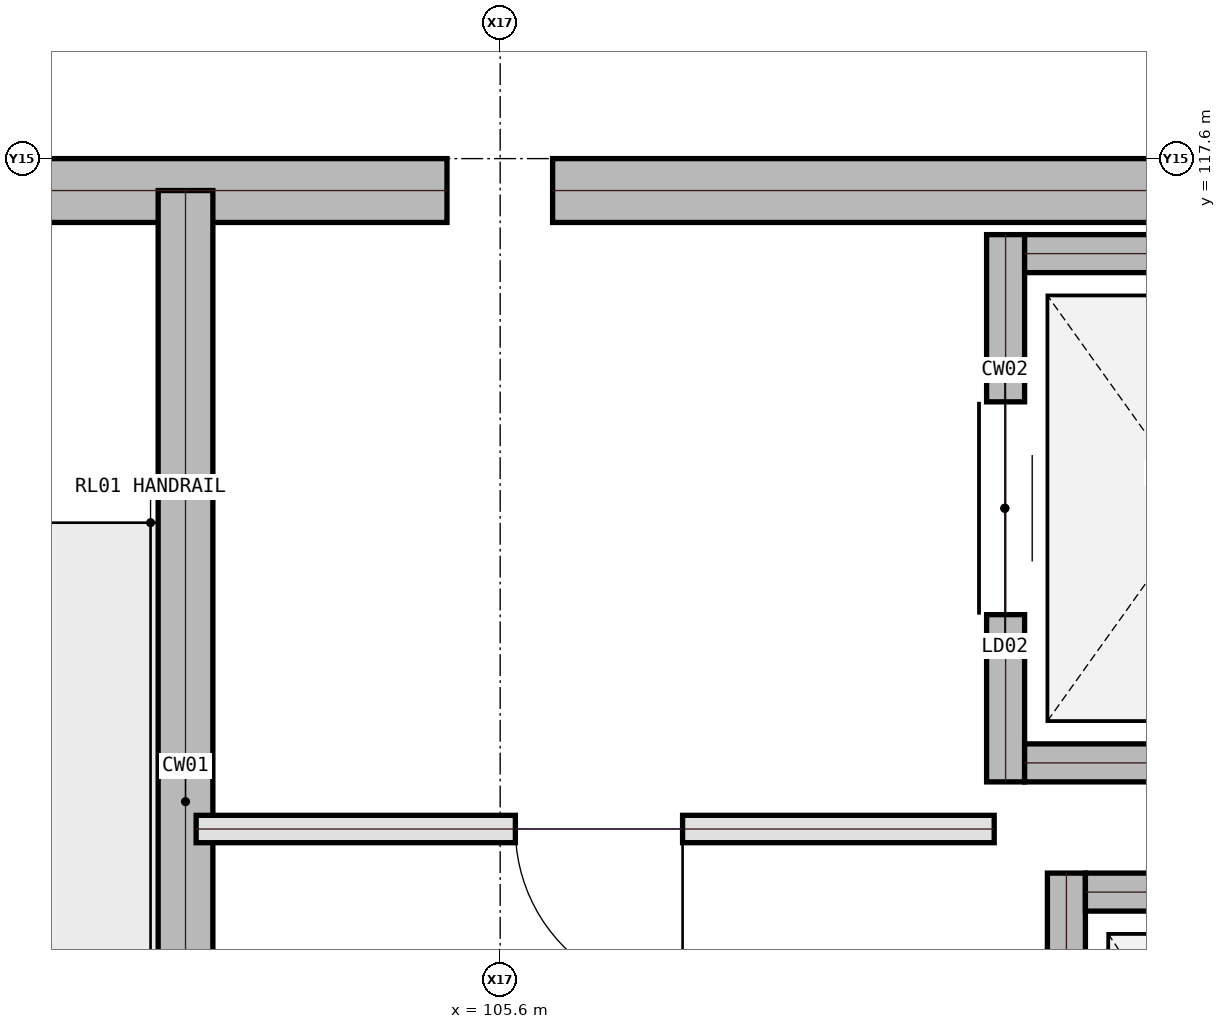
"""IFC4 building model, lengths in metres.
Left out: names, types, materials, properties, quantities, classifications, styles, units other than length and angle.
Written with IfcOpenShell. Run it as: python <this file> out.ifc"""

import sys

from ifc_helpers import new_model, si_unit, direction, frame, frame_2d, origin, origin_2d, place, context, subcontext, project, spatial, rectangle, extrude, element, fill, save


model = new_model("IFC4")
c1 = context("Model", 3, precision=1e-05, world=origin(), true_north=direction((0.0, 1.0)))
c2 = subcontext(c1, "Body", "Model", "MODEL_VIEW")
j1 = project(units=[si_unit("LENGTHUNIT", "METRE"), si_unit("PLANEANGLEUNIT", "RADIAN")], contexts=[c1])
p1 = place(None, origin())
s1 = spatial("IfcSite", under=j1, at=p1, CompositionType="ELEMENT")
p2 = place(p1, origin())
s2 = spatial("IfcBuilding", under=s1, at=p2, CompositionType="ELEMENT")
p3 = place(p2, frame((0.0, 0.0, -4.5)))
s3 = spatial("IfcBuildingStorey", under=s2, at=p3, CompositionType="ELEMENT", Elevation=-4.5)
p4 = place(p3, frame((105.6, 117.6, 0.0), z_axis=(0.0, 0.0, 1.0), x_axis=(1.0, 0.0, 0.0)))
e1 = element("IfcColumn", 1, at=p4, inside=s3, PredefinedType="COLUMN", context=c2, shape_type="SweptSolid", body=[
    extrude(rectangle(XDim=0.7, YDim=0.7, at=origin_2d()), origin(), (0.0, 0.0, 1.0), 4.5),
])
p5 = place(p3, frame((105.25, 117.39, 0.0), z_axis=(0.0, 0.0, 1.0), x_axis=(-1.0, 0.0, 0.0)))
e2 = element("IfcWall", 2, at=p5, inside=s3, PredefinedType="SOLIDWALL", context=c2, shape_type="SweptSolid", body=[
    extrude(rectangle(XDim=5.9, YDim=0.42, at=frame_2d((2.95, 0.0))), origin(), (0.0, 0.0, 1.0), 4.14),
])
p6 = place(p3, frame((111.855, 117.39, 0.0), z_axis=(0.0, 0.0, 1.0), x_axis=(-1.0, 0.0, 0.0)))
e3 = element("IfcWall", 3, at=p6, inside=s3, PredefinedType="SOLIDWALL", context=c2, shape_type="SweptSolid", body=[
    extrude(rectangle(XDim=5.91, YDim=0.42, at=frame_2d((2.955, 0.0))), origin(), (0.0, 0.0, 1.0), 4.14),
])
p7 = place(p3, frame((103.53, 109.34, 0.0), z_axis=(0.0, 0.0, 1.0), x_axis=(0.0, 1.0, 0.0)))
e4 = element("IfcWall", 4, at=p7, inside=s3, PredefinedType="SHEAR", context=c2, shape_type="SweptSolid", body=[
    extrude(rectangle(XDim=8.05, YDim=0.36, at=frame_2d((4.025, 0.0))), origin(), (0.0, 0.0, 1.0), 4.14),
])
p8 = place(p7, frame((0.45, 0.0, 0.0)))
e5 = element("IfcOpeningElement", 5, at=p8, cuts=e4, PredefinedType="OPENING", context=c2, shape_type="SweptSolid", body=[
    extrude(rectangle(XDim=1.25, YDim=2.15, at=frame_2d((0.625, 1.075))), frame((0.0, 0.19, 0.0), z_axis=(0.0, -1.0, 0.0), x_axis=(1.0, 0.0, 0.0)), (0.0, 0.0, 1.0), 0.38),
])
p9 = place(p3, frame((109.325, 109.7, 0.0), z_axis=(0.0, 0.0, 1.0), x_axis=(0.0, 1.0, 0.0)))
e6 = element("IfcWall", 6, at=p9, inside=s3, PredefinedType="SHEAR", context=c2, shape_type="SweptSolid", body=[
    extrude(rectangle(XDim=3.2, YDim=0.25, at=frame_2d((1.6, 0.0))), origin(), (0.0, 0.0, 1.0), 4.14),
])
p10 = place(p9, frame((1.05, 0.0, 0.0)))
e7 = element("IfcOpeningElement", 7, at=p10, cuts=e6, PredefinedType="OPENING", context=c2, shape_type="SweptSolid", body=[
    extrude(rectangle(XDim=1.1, YDim=2.15, at=frame_2d((0.55, 1.075))), frame((0.0, 0.135, 0.0), z_axis=(0.0, -1.0, 0.0), x_axis=(1.0, 0.0, 0.0)), (0.0, 0.0, 1.0), 0.27),
])
p11 = place(p3, frame((109.45, 112.775, 0.0), z_axis=(0.0, 0.0, 1.0), x_axis=(1.0, 0.0, 0.0)))
e8 = element("IfcWall", 8, at=p11, inside=s3, PredefinedType="SHEAR", context=c2, shape_type="SweptSolid", body=[
    extrude(rectangle(XDim=1.9, YDim=0.25, at=frame_2d((0.95, 0.0))), origin(), (0.0, 0.0, 1.0), 4.14),
])
p12 = place(p3, frame((108.925, 113.5, 0.0), z_axis=(0.0, 0.0, 1.0), x_axis=(0.0, 1.0, 0.0)))
e9 = element("IfcWall", 9, at=p12, inside=s3, PredefinedType="SHEAR", context=c2, shape_type="SweptSolid", body=[
    extrude(rectangle(XDim=3.6, YDim=0.25, at=frame_2d((1.8, 0.0))), origin(), (0.0, 0.0, 1.0), 4.14),
])
p13 = place(p12, frame((1.1, 0.0, 0.0)))
e10 = element("IfcOpeningElement", 10, at=p13, cuts=e9, PredefinedType="OPENING", context=c2, shape_type="SweptSolid", body=[
    extrude(rectangle(XDim=1.4, YDim=2.2, at=frame_2d((0.7, 1.1))), frame((0.0, 0.135, 0.0), z_axis=(0.0, -1.0, 0.0), x_axis=(1.0, 0.0, 0.0)), (0.0, 0.0, 1.0), 0.27),
])
for number, where, z_axis, x_axis in (
    (11, (109.05, 113.625, 0.0), (0.0, 0.0, 1.0), (1.0, 0.0, 0.0)),
    (12, (109.05, 116.975, 0.0), (0.0, 0.0, 1.0), (1.0, 0.0, 0.0)),
):
    element("IfcWall", number, at=place(p3, frame(where, z_axis=z_axis, x_axis=x_axis)), inside=s3, PredefinedType="SHEAR", context=c2, shape_type="SweptSolid", body=[
        extrude(rectangle(XDim=2.3, YDim=0.25, at=frame_2d((1.15, 0.0))), origin(), (0.0, 0.0, 1.0), 4.14),
    ])
p14 = place(p3, frame((103.6, 113.19, 0.0), z_axis=(0.0, 0.0, 1.0), x_axis=(1.0, 0.0, 0.0)))
e13 = element("IfcWall", 13, at=p14, inside=s3, PredefinedType="SOLIDWALL", context=c2, shape_type="SweptSolid", body=[
    extrude(rectangle(XDim=5.25, YDim=0.18, at=frame_2d((2.625, 0.0))), origin(), (0.0, 0.0, 1.0), 4.14),
])
p15 = place(p14, frame((2.1, 0.0, 0.0)))
e14 = element("IfcOpeningElement", 14, at=p15, cuts=e13, PredefinedType="OPENING", context=c2, shape_type="SweptSolid", body=[
    extrude(rectangle(XDim=1.1, YDim=2.15, at=frame_2d((0.55, 1.075))), frame((0.0, 0.1, 0.0), z_axis=(0.0, -1.0, 0.0), x_axis=(1.0, 0.0, 0.0)), (0.0, 0.0, 1.0), 0.2),
])
p16 = place(p13, origin())
e15 = element("IfcDoor", 15, at=p16, inside=s3, OperationType="SLIDING_TO_LEFT", PredefinedType="DOOR", context=c2, shape_type="SweptSolid", body=[
    extrude(rectangle(XDim=1.4, YDim=2.2, at=frame_2d((0.7, 1.1))), frame((0.0, 0.025, 0.0), z_axis=(0.0, -1.0, 0.0), x_axis=(1.0, 0.0, 0.0)), (0.0, 0.0, 1.0), 0.05),
])
fill(e10, e15)
p17 = place(p15, frame((1.1, 0.0, 0.0), z_axis=(0.0, 0.0, 1.0), x_axis=(-1.0, 0.0, 0.0)))
e16 = element("IfcDoor", 16, at=p17, inside=s3, OperationType="SINGLE_SWING_RIGHT", PredefinedType="DOOR", context=c2, shape_type="SweptSolid", body=[
    extrude(rectangle(XDim=1.1, YDim=2.15, at=frame_2d((0.55, 1.075))), frame((0.0, 0.025, 0.0), z_axis=(0.0, -1.0, 0.0), x_axis=(1.0, 0.0, 0.0)), (0.0, 0.0, 1.0), 0.05),
])
fill(e14, e16)
save(model, sys.argv[1])
